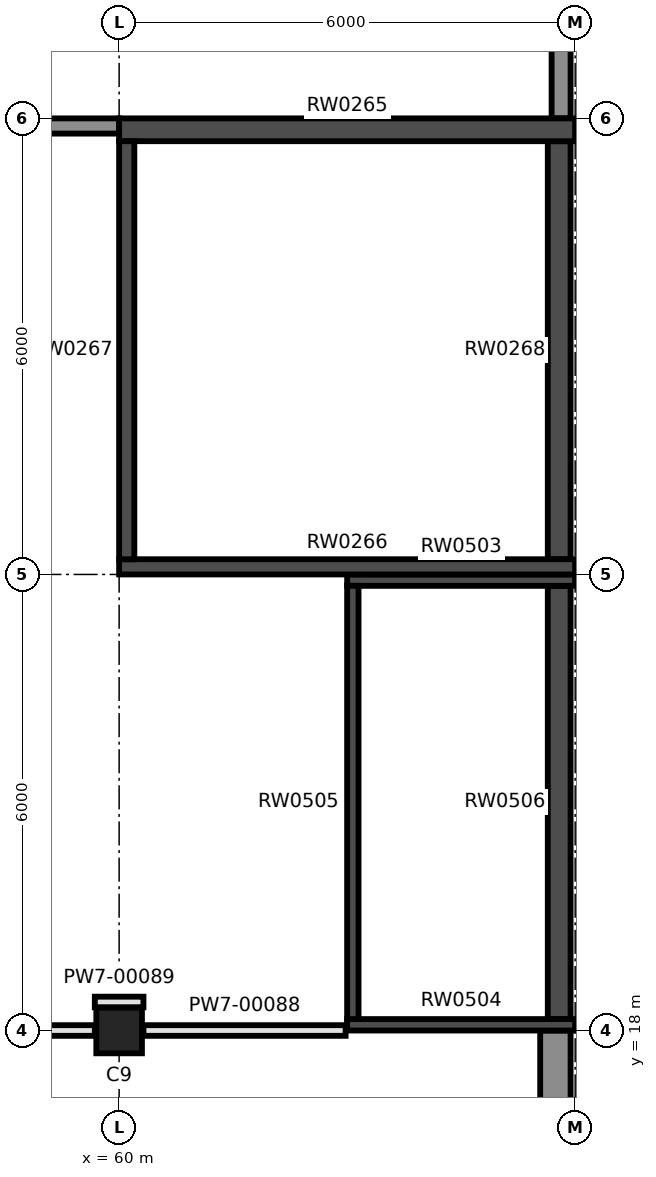
"""IFC4 building model, lengths in metres.
Left out: names, types, materials, properties, quantities, classifications, styles, units other than length and angle.
Written with IfcOpenShell. Run it as: python <this file> out.ifc"""

import sys

from ifc_helpers import new_model, si_unit, direction, frame, frame_2d, origin, origin_2d, place, context, subcontext, project, spatial, rectangle, extrude, element, fill, save


model = new_model("IFC4")
c1 = context("Model", 3, precision=1e-05, world=origin(), true_north=direction((0.0, 1.0)))
c2 = subcontext(c1, "Body", "Model", "MODEL_VIEW")
j1 = project(units=[si_unit("LENGTHUNIT", "METRE"), si_unit("PLANEANGLEUNIT", "RADIAN")], contexts=[c1])
p1 = place(None, origin())
s1 = spatial("IfcSite", under=j1, at=p1, CompositionType="ELEMENT")
p2 = place(p1, origin())
s2 = spatial("IfcBuilding", under=s1, at=p2, CompositionType="ELEMENT")
p3 = place(p2, origin())
s3 = spatial("IfcBuildingStorey", under=s2, at=p3, CompositionType="ELEMENT", Elevation=0.0)
p4 = place(p3, frame((60.0, 18.0, -0.3), z_axis=(0.0, 0.0, 1.0), x_axis=(1.0, 0.0, 0.0)))
e1 = element("IfcColumn", 1, at=p4, inside=s3, PredefinedType="COLUMN", context=c2, shape_type="SweptSolid", body=[
    extrude(rectangle(XDim=0.6, YDim=0.6, at=origin_2d()), origin(), (0.0, 0.0, 1.0), 7.3),
])
p5 = place(p3, frame((60.0, 29.85, -0.3), z_axis=(0.0, 0.0, 1.0), x_axis=(1.0, 0.0, 0.0)))
e2 = element("IfcWall", 2, at=p5, inside=s3, PredefinedType="SHEAR", context=c2, shape_type="SweptSolid", body=[
    extrude(rectangle(XDim=6.0, YDim=0.3, at=frame_2d((3.0, 0.0))), origin(), (0.0, 0.0, 1.0), 7.3),
])
p6 = place(p5, frame((0.3, 0.0, 0.3)))
e3 = element("IfcOpeningElement", 3, at=p6, cuts=e2, PredefinedType="OPENING", context=c2, shape_type="SweptSolid", body=[
    extrude(rectangle(XDim=1.1, YDim=2.4, at=frame_2d((0.55, 1.2))), frame((0.0, 0.16, 0.0), z_axis=(0.0, -1.0, 0.0), x_axis=(1.0, 0.0, 0.0)), (0.0, 0.0, 1.0), 0.32),
])
p7 = place(p3, frame((60.0, 24.1, -0.3), z_axis=(0.0, 0.0, 1.0), x_axis=(1.0, 0.0, 0.0)))
e4 = element("IfcWall", 4, at=p7, inside=s3, PredefinedType="SHEAR", context=c2, shape_type="SweptSolid", body=[
    extrude(rectangle(XDim=6.0, YDim=0.2, at=frame_2d((3.0, 0.0))), origin(), (0.0, 0.0, 1.0), 7.3),
])
p8 = place(p3, frame((60.1, 24.2, -0.3), z_axis=(0.0, 0.0, 1.0), x_axis=(0.0, 1.0, 0.0)))
e5 = element("IfcWall", 5, at=p8, inside=s3, PredefinedType="SHEAR", context=c2, shape_type="SweptSolid", body=[
    extrude(rectangle(XDim=5.5, YDim=0.2, at=frame_2d((2.75, 0.0))), origin(), (0.0, 0.0, 1.0), 7.3),
])
p9 = place(p8, frame((1.9, 0.0, 0.3)))
e6 = element("IfcOpeningElement", 6, at=p9, cuts=e5, PredefinedType="OPENING", context=c2, shape_type="SweptSolid", body=[
    extrude(rectangle(XDim=1.8, YDim=2.2, at=frame_2d((0.9, 1.1))), frame((0.0, 0.11, 0.0), z_axis=(0.0, -1.0, 0.0), x_axis=(1.0, 0.0, 0.0)), (0.0, 0.0, 1.0), 0.22),
])
p10 = place(p3, frame((65.79, 24.2, -0.3), z_axis=(0.0, 0.0, 1.0), x_axis=(0.0, 1.0, 0.0)))
e7 = element("IfcWall", 7, at=p10, inside=s3, PredefinedType="SHEAR", context=c2, shape_type="SweptSolid", body=[
    extrude(rectangle(XDim=5.5, YDim=0.3, at=frame_2d((2.75, 0.0))), origin(), (0.0, 0.0, 1.0), 7.3),
])
for number, where, z_axis, x_axis in (
    (8, (63.0, 23.925, -0.3), (0.0, 0.0, 1.0), (1.0, 0.0, 0.0)),
    (9, (63.0, 18.075, -0.3), (0.0, 0.0, 1.0), (1.0, 0.0, 0.0)),
):
    element("IfcWall", number, at=place(p3, frame(where, z_axis=z_axis, x_axis=x_axis)), inside=s3, PredefinedType="SHEAR", context=c2, shape_type="SweptSolid", body=[
        extrude(rectangle(XDim=3.0, YDim=0.15, at=frame_2d((1.5, 0.0))), origin(), (0.0, 0.0, 1.0), 7.3),
    ])
p11 = place(p3, frame((63.075, 18.15, -0.3), z_axis=(0.0, 0.0, 1.0), x_axis=(0.0, 1.0, 0.0)))
e10 = element("IfcWall", 10, at=p11, inside=s3, PredefinedType="SHEAR", context=c2, shape_type="SweptSolid", body=[
    extrude(rectangle(XDim=5.7, YDim=0.15, at=frame_2d((2.85, 0.0))), origin(), (0.0, 0.0, 1.0), 7.3),
])
p12 = place(p11, frame((2.5, 0.0, 0.3)))
e11 = element("IfcOpeningElement", 11, at=p12, cuts=e10, PredefinedType="OPENING", context=c2, shape_type="SweptSolid", body=[
    extrude(rectangle(XDim=0.6, YDim=2.04, at=frame_2d((0.3, 1.02))), frame((0.0, 0.085, 0.0), z_axis=(0.0, -1.0, 0.0), x_axis=(1.0, 0.0, 0.0)), (0.0, 0.0, 1.0), 0.17),
])
p13 = place(p3, frame((65.79, 18.15, -0.3), z_axis=(0.0, 0.0, 1.0), x_axis=(0.0, 1.0, 0.0)))
e12 = element("IfcWall", 12, at=p13, inside=s3, PredefinedType="SHEAR", context=c2, shape_type="SweptSolid", body=[
    extrude(rectangle(XDim=5.7, YDim=0.3, at=frame_2d((2.85, 0.0))), origin(), (0.0, 0.0, 1.0), 7.3),
])
p14 = place(p3, frame((65.74, 0.0, -0.3), z_axis=(0.0, 0.0, 1.0), x_axis=(0.0, 1.0, 0.0)))
e13 = element("IfcWall", 13, at=p14, inside=s3, PredefinedType="SOLIDWALL", context=c2, shape_type="SweptSolid", body=[
    extrude(rectangle(XDim=18.0, YDim=0.4, at=frame_2d((9.0, 0.0))), origin(), (0.0, 0.0, 1.0), 7.3),
])
p15 = place(p3, frame((65.815, 30.0, -0.3), z_axis=(0.0, 0.0, 1.0), x_axis=(0.0, 1.0, 0.0)))
e14 = element("IfcWall", 14, at=p15, inside=s3, PredefinedType="SOLIDWALL", context=c2, shape_type="SweptSolid", body=[
    extrude(rectangle(XDim=72.0, YDim=0.25, at=frame_2d((36.0, 0.0))), origin(), (0.0, 0.0, 1.0), 3.3),
])
p16 = place(p3, frame((54.325, 29.9, 0.0), z_axis=(0.0, 0.0, 1.0), x_axis=(1.0, 0.0, 0.0)))
e15 = element("IfcWall", 15, at=p16, inside=s3, PredefinedType="SOLIDWALL", context=c2, shape_type="SweptSolid", body=[
    extrude(rectangle(XDim=5.675, YDim=0.2, at=frame_2d((2.837, 0.0))), origin(), (0.0, 0.0, 1.0), 6.05),
])
p17 = place(p16, frame((1.745, 0.0, 0.0)))
e16 = element("IfcOpeningElement", 16, at=p17, cuts=e15, PredefinedType="OPENING", context=c2, shape_type="SweptSolid", body=[
    extrude(rectangle(XDim=1.8, YDim=2.4, at=frame_2d((0.9, 1.2))), frame((0.0, 0.11, 0.0), z_axis=(0.0, -1.0, 0.0), x_axis=(1.0, 0.0, 0.0)), (0.0, 0.0, 1.0), 0.22),
])
p18 = place(p16, frame((1.745, 0.0, 2.5)))
e17 = element("IfcOpeningElement", 17, at=p18, cuts=e15, PredefinedType="OPENING", context=c2, shape_type="SweptSolid", body=[
    extrude(rectangle(XDim=1.8, YDim=3.2, at=frame_2d((0.9, 1.6))), frame((0.0, 0.11, 0.0), z_axis=(0.0, -1.0, 0.0), x_axis=(1.0, 0.0, 0.0)), (0.0, 0.0, 1.0), 0.22),
])
p19 = place(p16, frame((0.2, 0.0, 0.1)))
e18 = element("IfcOpeningElement", 18, at=p19, cuts=e15, PredefinedType="OPENING", context=c2, shape_type="SweptSolid", body=[
    extrude(rectangle(XDim=1.545, YDim=5.6, at=frame_2d((0.772, 2.8))), frame((0.0, 0.11, 0.0), z_axis=(0.0, -1.0, 0.0), x_axis=(1.0, 0.0, 0.0)), (0.0, 0.0, 1.0), 0.22),
])
p20 = place(p16, frame((3.545, 0.0, 0.1)))
e19 = element("IfcOpeningElement", 19, at=p20, cuts=e15, PredefinedType="OPENING", context=c2, shape_type="SweptSolid", body=[
    extrude(rectangle(XDim=1.93, YDim=5.6, at=frame_2d((0.965, 2.8))), frame((0.0, 0.11, 0.0), z_axis=(0.0, -1.0, 0.0), x_axis=(1.0, 0.0, 0.0)), (0.0, 0.0, 1.0), 0.22),
])
p21 = place(p3, frame((54.295, 18.0, 0.0), z_axis=(0.0, 0.0, 1.0), x_axis=(1.0, 0.0, 0.0)))
e20 = element("IfcWall", 20, at=p21, inside=s3, PredefinedType="PARTITIONING", context=c2, shape_type="SweptSolid", body=[
    extrude(rectangle(XDim=5.385, YDim=0.14, at=frame_2d((2.692, 0.0))), origin(), (0.0, 0.0, 1.0), 2.75),
])
p22 = place(p21, frame((3.255, 0.0, 0.0)))
e21 = element("IfcOpeningElement", 21, at=p22, cuts=e20, PredefinedType="OPENING", context=c2, shape_type="SweptSolid", body=[
    extrude(rectangle(XDim=1.8, YDim=2.1, at=frame_2d((0.9, 1.05))), frame((0.0, 0.08, 0.0), z_axis=(0.0, -1.0, 0.0), x_axis=(1.0, 0.0, 0.0)), (0.0, 0.0, 1.0), 0.16),
])
p23 = place(p3, frame((60.32, 18.0, 0.0), z_axis=(0.0, 0.0, 1.0), x_axis=(1.0, 0.0, 0.0)))
e22 = element("IfcWall", 22, at=p23, inside=s3, PredefinedType="PARTITIONING", context=c2, shape_type="SweptSolid", body=[
    extrude(rectangle(XDim=2.66, YDim=0.14, at=frame_2d((1.33, 0.0))), origin(), (0.0, 0.0, 1.0), 6.15),
])
p24 = place(p3, frame((59.68, 18.375, 0.0), z_axis=(0.0, 0.0, 1.0), x_axis=(1.0, 0.0, 0.0)))
e23 = element("IfcWall", 23, at=p24, inside=s3, PredefinedType="PARTITIONING", context=c2, shape_type="SweptSolid", body=[
    extrude(rectangle(XDim=0.64, YDim=0.14, at=frame_2d((0.32, 0.0))), origin(), (0.0, 0.0, 1.0), 6.15),
])
p25 = place(p20, origin())
e24 = element("IfcWindow", 24, at=p25, inside=s3, PartitioningType="SINGLE_PANEL", PredefinedType="WINDOW", context=c2, shape_type="SweptSolid", body=[
    extrude(rectangle(XDim=1.93, YDim=5.6, at=frame_2d((0.965, 2.8))), frame((0.0, 0.03, 0.0), z_axis=(0.0, -1.0, 0.0), x_axis=(1.0, 0.0, 0.0)), (0.0, 0.0, 1.0), 0.06),
])
fill(e19, e24)
p26 = place(p6, origin())
e25 = element("IfcDoor", 25, at=p26, inside=s3, OperationType="DOUBLE_DOOR_SINGLE_SWING", PredefinedType="DOOR", context=c2, shape_type="SweptSolid", body=[
    extrude(rectangle(XDim=1.1, YDim=2.4, at=frame_2d((0.55, 1.2))), frame((0.0, 0.025, 0.0), z_axis=(0.0, -1.0, 0.0), x_axis=(1.0, 0.0, 0.0)), (0.0, 0.0, 1.0), 0.05),
])
fill(e3, e25)
p27 = place(p9, frame((1.8, 0.0, 0.0), z_axis=(0.0, 0.0, 1.0), x_axis=(-1.0, 0.0, 0.0)))
e26 = element("IfcDoor", 26, at=p27, inside=s3, OperationType="DOUBLE_DOOR_SINGLE_SWING", PredefinedType="DOOR", context=c2, shape_type="SweptSolid", body=[
    extrude(rectangle(XDim=1.8, YDim=2.2, at=frame_2d((0.9, 1.1))), frame((0.0, 0.025, 0.0), z_axis=(0.0, -1.0, 0.0), x_axis=(1.0, 0.0, 0.0)), (0.0, 0.0, 1.0), 0.05),
])
fill(e6, e26)
p28 = place(p12, frame((0.6, 0.0, 0.0), z_axis=(0.0, 0.0, 1.0), x_axis=(-1.0, 0.0, 0.0)))
e27 = element("IfcDoor", 27, at=p28, inside=s3, OperationType="SINGLE_SWING_LEFT", PredefinedType="DOOR", context=c2, shape_type="SweptSolid", body=[
    extrude(rectangle(XDim=0.6, YDim=2.04, at=frame_2d((0.3, 1.02))), frame((0.0, 0.025, 0.0), z_axis=(0.0, -1.0, 0.0), x_axis=(1.0, 0.0, 0.0)), (0.0, 0.0, 1.0), 0.05),
])
fill(e11, e27)
p29 = place(p22, origin())
e28 = element("IfcDoor", 28, at=p29, inside=s3, OperationType="DOUBLE_DOOR_SINGLE_SWING", PredefinedType="DOOR", context=c2, shape_type="SweptSolid", body=[
    extrude(rectangle(XDim=1.8, YDim=2.1, at=frame_2d((0.9, 1.05))), frame((0.0, 0.025, 0.0), z_axis=(0.0, -1.0, 0.0), x_axis=(1.0, 0.0, 0.0)), (0.0, 0.0, 1.0), 0.05),
])
fill(e21, e28)
save(model, sys.argv[1])
